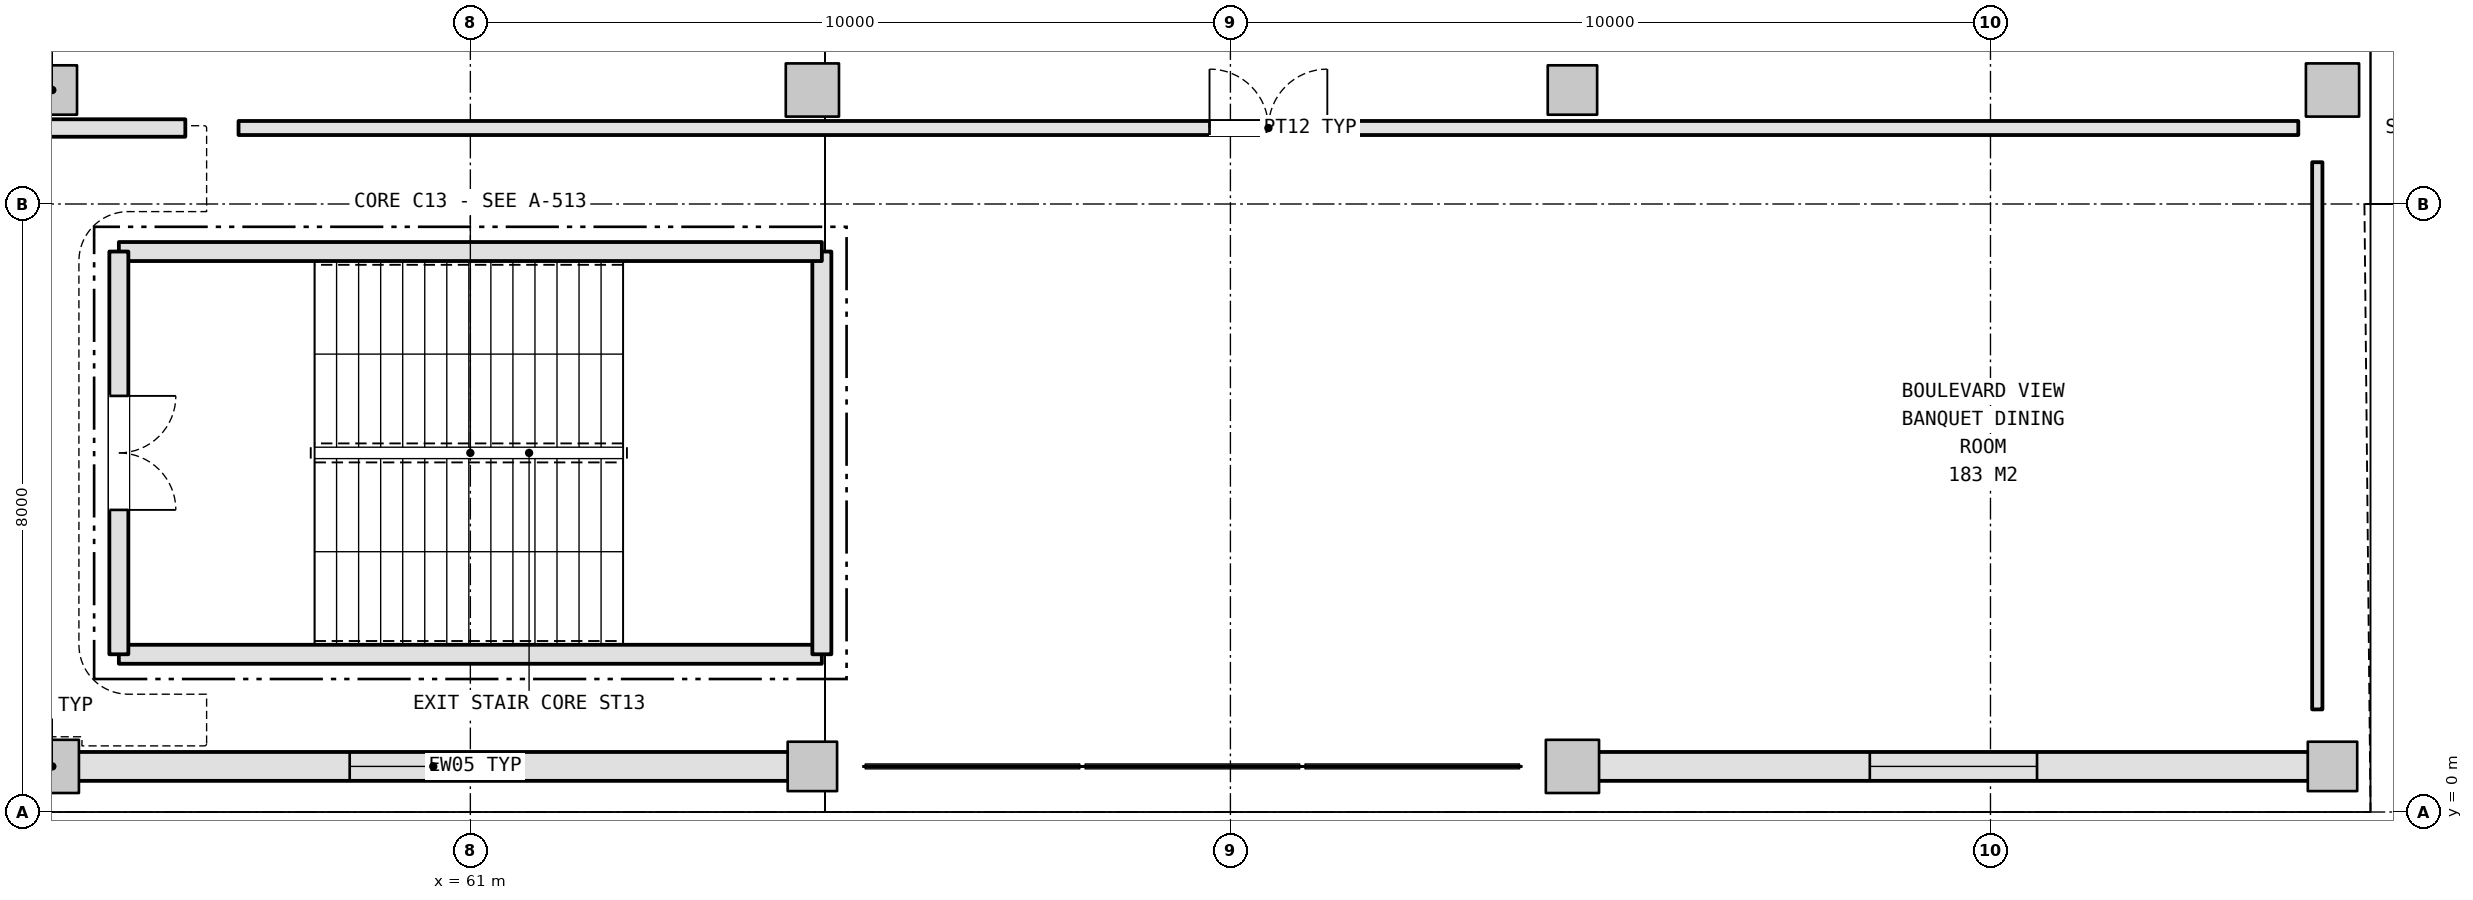
"""IFC4 building model, lengths in metres.
Left out: names, types, materials, properties, quantities, classifications, styles, units other than length and angle.
Written with IfcOpenShell. Run it as: python <this file> out.ifc"""

import sys

from ifc_helpers import new_model, si_unit, direction, frame, frame_2d, origin, origin_2d, place, context, subcontext, project, spatial, rectangle, extrude, element, fill, save


model = new_model("IFC4")
c1 = context("Model", 3, precision=1e-05, world=origin(), true_north=direction((0.0, 1.0)))
c2 = subcontext(c1, "Body", "Model", "MODEL_VIEW")
j1 = project(units=[si_unit("LENGTHUNIT", "METRE"), si_unit("PLANEANGLEUNIT", "RADIAN")], contexts=[c1])
p1 = place(None, origin())
s1 = spatial("IfcSite", under=j1, at=p1, CompositionType="ELEMENT")
p2 = place(p1, origin())
s2 = spatial("IfcBuilding", under=s1, at=p2, CompositionType="ELEMENT")
p3 = place(p2, frame((0.0, 0.0, 10.8)))
s3 = spatial("IfcBuildingStorey", under=s2, at=p3, CompositionType="ELEMENT", Elevation=10.8)
p4 = place(p3, frame((55.5, 0.6, 0.0), z_axis=(0.0, 0.0, 1.0), x_axis=(1.0, 0.0, 0.0)))
e1 = element("IfcColumn", 1, at=p4, inside=s3, PredefinedType="COLUMN", context=c2, shape_type="SweptSolid", body=[
    extrude(rectangle(XDim=0.7, YDim=0.7, at=origin_2d()), origin(), (0.0, 0.0, 1.0), 5.4),
])
for number, where, z_axis, x_axis in (
    (2, (55.5, 9.5, 0.0), (0.0, 0.0, 1.0), (1.0, 0.0, 0.0)),
    (3, (65.5, 0.6, 0.0), (0.0, 0.0, 1.0), (1.0, 0.0, 0.0)),
):
    element("IfcColumn", number, at=place(p3, frame(where, z_axis=z_axis, x_axis=x_axis)), inside=s3, PredefinedType="COLUMN", context=c2, shape_type="SweptSolid", body=[
        extrude(rectangle(XDim=0.65, YDim=0.65, at=origin_2d()), origin(), (0.0, 0.0, 1.0), 5.4),
    ])
for number, where, z_axis, x_axis in (
    (4, (65.5, 9.5, 0.0), (0.0, 0.0, 1.0), (1.0, 0.0, 0.0)),
    (5, (75.5, 0.6, 0.0), (0.0, 0.0, 1.0), (1.0, 0.0, 0.0)),
):
    element("IfcColumn", number, at=place(p3, frame(where, z_axis=z_axis, x_axis=x_axis)), inside=s3, PredefinedType="COLUMN", context=c2, shape_type="SweptSolid", body=[
        extrude(rectangle(XDim=0.7, YDim=0.7, at=origin_2d()), origin(), (0.0, 0.0, 1.0), 5.4),
    ])
for number, where, z_axis, x_axis in (
    (6, (75.5, 9.5, 0.0), (0.0, 0.0, 1.0), (1.0, 0.0, 0.0)),
    (7, (85.5, 0.6, 0.0), (0.0, 0.0, 1.0), (1.0, 0.0, 0.0)),
):
    element("IfcColumn", number, at=place(p3, frame(where, z_axis=z_axis, x_axis=x_axis)), inside=s3, PredefinedType="COLUMN", context=c2, shape_type="SweptSolid", body=[
        extrude(rectangle(XDim=0.65, YDim=0.65, at=origin_2d()), origin(), (0.0, 0.0, 1.0), 5.4),
    ])
p5 = place(p3, frame((85.5, 9.5, 0.0), z_axis=(0.0, 0.0, 1.0), x_axis=(1.0, 0.0, 0.0)))
e8 = element("IfcColumn", 8, at=p5, inside=s3, PredefinedType="COLUMN", context=c2, shape_type="SweptSolid", body=[
    extrude(rectangle(XDim=0.7, YDim=0.7, at=origin_2d()), origin(), (0.0, 0.0, 1.0), 5.4),
])
p6 = place(p3, frame((55.838, 0.6, 0.0), z_axis=(0.0, 0.0, 1.0), x_axis=(1.0, 0.0, 0.0)))
e9 = element("IfcWall", 9, at=p6, inside=s3, PredefinedType="SOLIDWALL", context=c2, shape_type="SweptSolid", body=[
    extrude(rectangle(XDim=9.349, YDim=0.38, at=frame_2d((4.675, 0.0))), origin(), (0.0, 0.0, 1.0), 4.435),
])
p7 = place(p6, frame((3.574, 0.0, 1.05)))
e10 = element("IfcOpeningElement", 10, at=p7, cuts=e9, PredefinedType="OPENING", context=c2, shape_type="SweptSolid", body=[
    extrude(rectangle(XDim=2.2, YDim=1.8, at=frame_2d((1.1, 0.9))), frame((0.0, 0.2, 0.0), z_axis=(0.0, -1.0, 0.0), x_axis=(1.0, 0.0, 0.0)), (0.0, 0.0, 1.0), 0.4),
])
p8 = place(p3, frame((75.838, 0.6, 0.0), z_axis=(0.0, 0.0, 1.0), x_axis=(1.0, 0.0, 0.0)))
e11 = element("IfcWall", 11, at=p8, inside=s3, PredefinedType="SOLIDWALL", context=c2, shape_type="SweptSolid", body=[
    extrude(rectangle(XDim=9.349, YDim=0.38, at=frame_2d((4.675, 0.0))), origin(), (0.0, 0.0, 1.0), 4.435),
])
p9 = place(p8, frame((3.574, 0.0, 1.05)))
e12 = element("IfcOpeningElement", 12, at=p9, cuts=e11, PredefinedType="OPENING", context=c2, shape_type="SweptSolid", body=[
    extrude(rectangle(XDim=2.2, YDim=1.8, at=frame_2d((1.1, 0.9))), frame((0.0, 0.2, 0.0), z_axis=(0.0, -1.0, 0.0), x_axis=(1.0, 0.0, 0.0)), (0.0, 0.0, 1.0), 0.4),
])
p10 = place(p3, frame((56.375, 2.075, 0.0), z_axis=(0.0, 0.0, 1.0), x_axis=(1.0, 0.0, 0.0)))
e13 = element("IfcWall", 13, at=p10, inside=s3, PredefinedType="SHEAR", context=c2, shape_type="SweptSolid", body=[
    extrude(rectangle(XDim=9.249, YDim=0.25, at=frame_2d((4.625, 0.0))), origin(), (0.0, 0.0, 1.0), 5.15),
])
p11 = place(p3, frame((65.625, 2.075, 0.0), z_axis=(0.0, 0.0, 1.0), x_axis=(0.0, 1.0, 0.0)))
e14 = element("IfcWall", 14, at=p11, inside=s3, PredefinedType="SHEAR", context=c2, shape_type="SweptSolid", body=[
    extrude(rectangle(XDim=5.299, YDim=0.25, at=frame_2d((2.649, 0.0))), origin(), (0.0, 0.0, 1.0), 5.15),
])
p12 = place(p3, frame((65.625, 7.375, 0.0), z_axis=(0.0, 0.0, 1.0), x_axis=(-1.0, 0.0, 0.0)))
e15 = element("IfcWall", 15, at=p12, inside=s3, PredefinedType="SHEAR", context=c2, shape_type="SweptSolid", body=[
    extrude(rectangle(XDim=9.249, YDim=0.25, at=frame_2d((4.625, 0.0))), origin(), (0.0, 0.0, 1.0), 5.15),
])
p13 = place(p3, frame((56.375, 7.375, 0.0), z_axis=(0.0, 0.0, 1.0), x_axis=(0.0, -1.0, 0.0)))
e16 = element("IfcWall", 16, at=p13, inside=s3, PredefinedType="SHEAR", context=c2, shape_type="SweptSolid", body=[
    extrude(rectangle(XDim=5.299, YDim=0.25, at=frame_2d((2.649, 0.0))), origin(), (0.0, 0.0, 1.0), 5.15),
])
p14 = place(p13, frame((1.9, 0.0, 0.0)))
e17 = element("IfcOpeningElement", 17, at=p14, cuts=e16, PredefinedType="OPENING", context=c2, shape_type="SweptSolid", body=[
    extrude(rectangle(XDim=1.5, YDim=2.2, at=frame_2d((0.75, 1.1))), frame((0.0, 0.135, 0.0), z_axis=(0.0, -1.0, 0.0), x_axis=(1.0, 0.0, 0.0)), (0.0, 0.0, 1.0), 0.27),
])
p15 = place(p3, frame((25.95, 9.0, 0.0), z_axis=(0.0, 0.0, 1.0), x_axis=(1.0, 0.0, 0.0)))
e18 = element("IfcWall", 18, at=p15, inside=s3, PredefinedType="PLUMBINGWALL", context=c2, shape_type="SweptSolid", body=[
    extrude(rectangle(XDim=31.3, YDim=0.23, at=frame_2d((15.65, 0.0))), origin(), (0.0, 0.0, 1.0), 4.435),
])
p16 = place(p15, frame((15.11, 0.0, 0.0)))
e19 = element("IfcOpeningElement", 19, at=p16, cuts=e18, PredefinedType="OPENING", context=c2, shape_type="SweptSolid", body=[
    extrude(rectangle(XDim=1.08, YDim=2.25, at=frame_2d((0.54, 1.125))), frame((0.0, 0.125, 0.0), z_axis=(0.0, -1.0, 0.0), x_axis=(1.0, 0.0, 0.0)), (0.0, 0.0, 1.0), 0.25),
])
p17 = place(p3, frame((57.95, 9.0, 0.0), z_axis=(0.0, 0.0, 1.0), x_axis=(1.0, 0.0, 0.0)))
e20 = element("IfcWall", 20, at=p17, inside=s3, PredefinedType="PARTITIONING", context=c2, shape_type="SweptSolid", body=[
    extrude(rectangle(XDim=27.1, YDim=0.185, at=frame_2d((13.55, 0.0))), origin(), (0.0, 0.0, 1.0), 4.435),
])
p18 = place(p17, frame((12.775, 0.0, 0.0)))
e21 = element("IfcOpeningElement", 21, at=p18, cuts=e20, PredefinedType="OPENING", context=c2, shape_type="SweptSolid", body=[
    extrude(rectangle(XDim=1.55, YDim=2.15, at=frame_2d((0.775, 1.075))), frame((0.0, 0.103, 0.0), z_axis=(0.0, -1.0, 0.0), x_axis=(1.0, 0.0, 0.0)), (0.0, 0.0, 1.0), 0.205),
])
p19 = place(p3, frame((85.3, 8.55, 0.0), z_axis=(0.0, 0.0, 1.0), x_axis=(0.0, -1.0, 0.0)))
e22 = element("IfcWall", 22, at=p19, inside=s3, PredefinedType="PARTITIONING", context=c2, shape_type="SweptSolid", body=[
    extrude(rectangle(XDim=7.2, YDim=0.135, at=frame_2d((3.6, 0.0))), origin(), (0.0, 0.0, 1.0), 4.485),
])
p20 = place(p7, origin())
e23 = element("IfcWindow", 23, at=p20, inside=s3, PartitioningType="SINGLE_PANEL", PredefinedType="WINDOW", context=c2, shape_type="SweptSolid", body=[
    extrude(rectangle(XDim=2.2, YDim=1.8, at=frame_2d((1.1, 0.9))), frame((0.0, 0.03, 0.0), z_axis=(0.0, -1.0, 0.0), x_axis=(1.0, 0.0, 0.0)), (0.0, 0.0, 1.0), 0.06),
])
fill(e10, e23)
p21 = place(p9, origin())
e24 = element("IfcWindow", 24, at=p21, inside=s3, PartitioningType="SINGLE_PANEL", PredefinedType="WINDOW", context=c2, shape_type="SweptSolid", body=[
    extrude(rectangle(XDim=2.2, YDim=1.8, at=frame_2d((1.1, 0.9))), frame((0.0, 0.03, 0.0), z_axis=(0.0, -1.0, 0.0), x_axis=(1.0, 0.0, 0.0)), (0.0, 0.0, 1.0), 0.06),
])
fill(e12, e24)
p22 = place(p14, origin())
e25 = element("IfcDoor", 25, at=p22, inside=s3, OperationType="DOUBLE_DOOR_SINGLE_SWING", PredefinedType="DOOR", context=c2, shape_type="SweptSolid", body=[
    extrude(rectangle(XDim=1.5, YDim=2.2, at=frame_2d((0.75, 1.1))), frame((0.0, 0.025, 0.0), z_axis=(0.0, -1.0, 0.0), x_axis=(1.0, 0.0, 0.0)), (0.0, 0.0, 1.0), 0.05),
])
fill(e17, e25)
p23 = place(p18, origin())
e26 = element("IfcDoor", 26, at=p23, inside=s3, OperationType="DOUBLE_DOOR_SINGLE_SWING", PredefinedType="DOOR", context=c2, shape_type="SweptSolid", body=[
    extrude(rectangle(XDim=1.55, YDim=2.15, at=frame_2d((0.775, 1.075))), frame((0.0, 0.025, 0.0), z_axis=(0.0, -1.0, 0.0), x_axis=(1.0, 0.0, 0.0)), (0.0, 0.0, 1.0), 0.05),
])
fill(e21, e26)
save(model, sys.argv[1])
